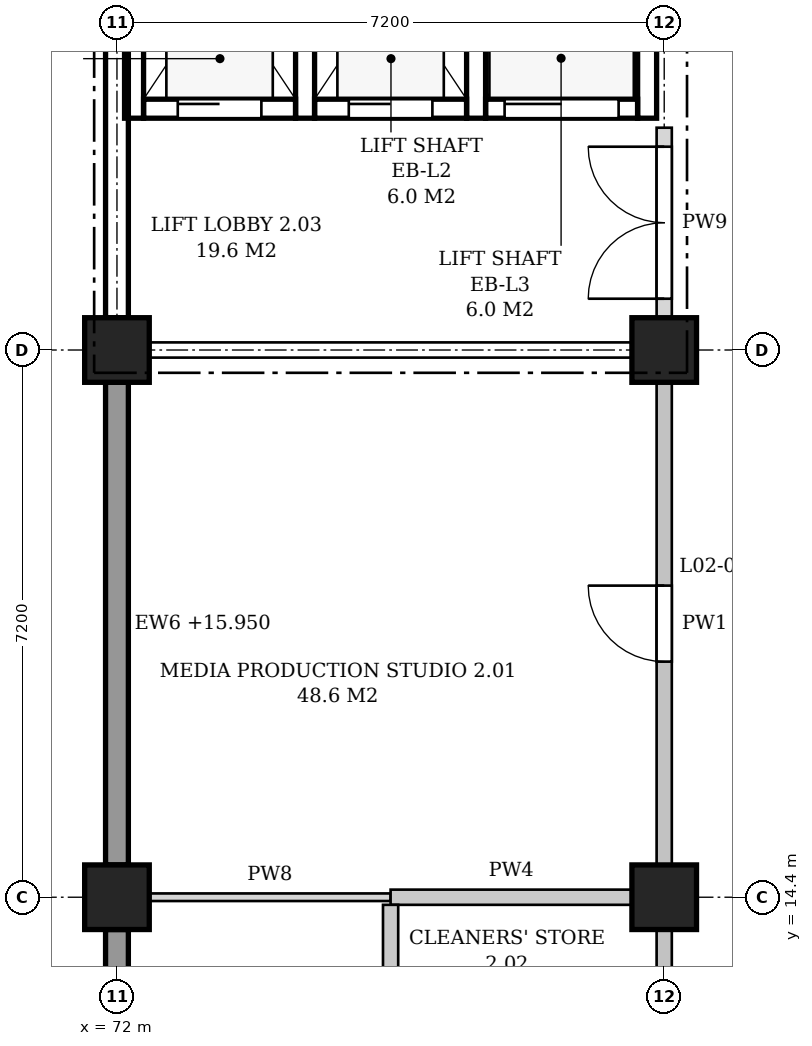
"""IFC4 building model, lengths in metres.
Left out: names, types, materials, properties, quantities, classifications, styles, units other than length and angle.
Written with IfcOpenShell. Run it as: python <this file> out.ifc"""

import sys

from ifc_helpers import new_model, si_unit, direction, frame, frame_2d, origin, origin_2d, place, context, subcontext, project, spatial, polyline, rectangle, outline, extrude, element, fill, save


model = new_model("IFC4")
c1 = context("Model", 3, precision=1e-05, world=origin(), true_north=direction((0.0, 1.0)))
c2 = subcontext(c1, "Body", "Model", "MODEL_VIEW")
j1 = project(units=[si_unit("LENGTHUNIT", "METRE"), si_unit("PLANEANGLEUNIT", "RADIAN")], contexts=[c1])
p1 = place(None, origin())
s1 = spatial("IfcSite", under=j1, at=p1, CompositionType="ELEMENT")
p2 = place(p1, origin())
s2 = spatial("IfcBuilding", under=s1, at=p2, CompositionType="ELEMENT")
p3 = place(p2, frame((0.0, 0.0, 11.4)))
s3 = spatial("IfcBuildingStorey", under=s2, at=p3, CompositionType="ELEMENT", Elevation=11.4)
for number, where, z_axis, x_axis in (
    (1, (72.0, 14.4, 0.0), (0.0, 0.0, 1.0), (1.0, 0.0, 0.0)),
    (2, (72.0, 21.6, 0.0), (0.0, 0.0, 1.0), (1.0, 0.0, 0.0)),
    (3, (79.2, 14.4, 0.0), (0.0, 0.0, 1.0), (1.0, 0.0, 0.0)),
    (4, (79.2, 21.6, 0.0), (0.0, 0.0, 1.0), (1.0, 0.0, 0.0)),
):
    element("IfcColumn", number, at=place(p3, frame(where, z_axis=z_axis, x_axis=x_axis)), inside=s3, PredefinedType="COLUMN", context=c2, shape_type="SweptSolid", body=[
        extrude(rectangle(XDim=0.85, YDim=0.85, at=origin_2d()), origin(), (0.0, 0.0, 1.0), 5.4),
    ])
for number, where, z_axis, x_axis in (
    (5, (72.0, 7.625, 0.0), (0.0, 0.0, 1.0), (0.0, 1.0, 0.0)),
    (6, (72.0, 14.825, 0.0), (0.0, 0.0, 1.0), (0.0, 1.0, 0.0)),
    (7, (72.0, 22.025, 0.0), (0.0, 0.0, 1.0), (0.0, 1.0, 0.0)),
):
    element("IfcWall", number, at=place(p3, frame(where, z_axis=z_axis, x_axis=x_axis)), inside=s3, PredefinedType="STANDARD", context=c2, shape_type="SweptSolid", body=[
        extrude(rectangle(XDim=6.35, YDim=0.3, at=frame_2d((3.175, 0.0))), origin(), (0.0, 0.0, 1.0), 4.55),
    ])
p4 = place(p3, frame((72.225, 24.65, -0.25), z_axis=(0.0, 0.0, 1.0), x_axis=(0.0, 1.0, 0.0)))
e8 = element("IfcWall", 8, at=p4, inside=s3, PredefinedType="SHEAR", context=c2, shape_type="SweptSolid", body=[
    extrude(rectangle(XDim=3.725, YDim=0.25, at=frame_2d((1.863, 0.0))), origin(), (0.0, 0.0, 1.0), 5.4),
])
for number, where, z_axis, x_axis in (
    (9, (74.475, 24.65, -0.25), (0.0, 0.0, 1.0), (0.0, 1.0, 0.0)),
    (10, (76.725, 24.65, -0.25), (0.0, 0.0, 1.0), (0.0, 1.0, 0.0)),
):
    element("IfcWall", number, at=place(p3, frame(where, z_axis=z_axis, x_axis=x_axis)), inside=s3, PredefinedType="SHEAR", context=c2, shape_type="SweptSolid", body=[
        extrude(rectangle(XDim=3.5, YDim=0.25, at=frame_2d((1.75, 0.0))), origin(), (0.0, 0.0, 1.0), 5.4),
    ])
p5 = place(p3, frame((78.975, 24.65, -0.25), z_axis=(0.0, 0.0, 1.0), x_axis=(0.0, 1.0, 0.0)))
e11 = element("IfcWall", 11, at=p5, inside=s3, PredefinedType="SHEAR", context=c2, shape_type="SweptSolid", body=[
    extrude(rectangle(XDim=3.725, YDim=0.25, at=frame_2d((1.863, 0.0))), origin(), (0.0, 0.0, 1.0), 5.4),
])
p6 = place(p3, frame((72.35, 24.775, -0.25), z_axis=(0.0, 0.0, 1.0), x_axis=(1.0, 0.0, 0.0)))
e12 = element("IfcWall", 12, at=p6, inside=s3, PredefinedType="SHEAR", context=c2, shape_type="SweptSolid", body=[
    extrude(rectangle(XDim=2.0, YDim=0.25, at=frame_2d((1.0, 0.0))), origin(), (0.0, 0.0, 1.0), 5.4),
])
p7 = place(p6, frame((0.45, 0.0, 0.25)))
e13 = element("IfcOpeningElement", 13, at=p7, cuts=e12, PredefinedType="OPENING", context=c2, shape_type="SweptSolid", body=[
    extrude(rectangle(XDim=1.1, YDim=2.1, at=frame_2d((0.55, 1.05))), frame((0.0, 0.135, 0.0), z_axis=(0.0, -1.0, 0.0), x_axis=(1.0, 0.0, 0.0)), (0.0, 0.0, 1.0), 0.27),
])
p8 = place(p3, frame((74.6, 24.775, -0.25), z_axis=(0.0, 0.0, 1.0), x_axis=(1.0, 0.0, 0.0)))
e14 = element("IfcWall", 14, at=p8, inside=s3, PredefinedType="SHEAR", context=c2, shape_type="SweptSolid", body=[
    extrude(rectangle(XDim=2.0, YDim=0.25, at=frame_2d((1.0, 0.0))), origin(), (0.0, 0.0, 1.0), 5.4),
])
p9 = place(p8, frame((0.45, 0.0, 0.25)))
e15 = element("IfcOpeningElement", 15, at=p9, cuts=e14, PredefinedType="OPENING", context=c2, shape_type="SweptSolid", body=[
    extrude(rectangle(XDim=1.1, YDim=2.1, at=frame_2d((0.55, 1.05))), frame((0.0, 0.135, 0.0), z_axis=(0.0, -1.0, 0.0), x_axis=(1.0, 0.0, 0.0)), (0.0, 0.0, 1.0), 0.27),
])
p10 = place(p3, frame((76.85, 24.775, -0.25), z_axis=(0.0, 0.0, 1.0), x_axis=(1.0, 0.0, 0.0)))
e16 = element("IfcWall", 16, at=p10, inside=s3, PredefinedType="SHEAR", context=c2, shape_type="SweptSolid", body=[
    extrude(rectangle(XDim=2.0, YDim=0.25, at=frame_2d((1.0, 0.0))), origin(), (0.0, 0.0, 1.0), 5.4),
])
p11 = place(p10, frame((0.25, 0.0, 0.25)))
e17 = element("IfcOpeningElement", 17, at=p11, cuts=e16, PredefinedType="OPENING", context=c2, shape_type="SweptSolid", body=[
    extrude(rectangle(XDim=1.5, YDim=2.1, at=frame_2d((0.75, 1.05))), frame((0.0, 0.135, 0.0), z_axis=(0.0, -1.0, 0.0), x_axis=(1.0, 0.0, 0.0)), (0.0, 0.0, 1.0), 0.27),
])
p12 = place(p3, frame((72.425, 14.4, 0.0), z_axis=(0.0, 0.0, 1.0), x_axis=(1.0, 0.0, 0.0)))
e18 = element("IfcWall", 18, at=p12, inside=s3, PredefinedType="PARTITIONING", context=c2, shape_type="SweptSolid", body=[
    extrude(rectangle(XDim=3.175, YDim=0.1, at=frame_2d((1.587, 0.0))), origin(), (0.0, 0.0, 1.0), 4.4),
])
p13 = place(p3, frame((75.6, 14.4, 0.0), z_axis=(0.0, 0.0, 1.0), x_axis=(1.0, 0.0, 0.0)))
e19 = element("IfcWall", 19, at=p13, inside=s3, PredefinedType="PARTITIONING", context=c2, shape_type="SweptSolid", body=[
    extrude(rectangle(XDim=3.175, YDim=0.2, at=frame_2d((1.587, 0.0))), origin(), (0.0, 0.0, 1.0), 4.4),
])
p14 = place(p3, frame((72.425, 21.6, 0.0), z_axis=(0.0, 0.0, 1.0), x_axis=(1.0, 0.0, 0.0)))
e20 = element("IfcWall", 20, at=p14, inside=s3, PredefinedType="PARTITIONING", context=c2, shape_type="SweptSolid", body=[
    extrude(rectangle(XDim=6.35, YDim=0.2, at=frame_2d((3.175, 0.0))), origin(), (0.0, 0.0, 1.0), 4.4),
])
p15 = place(p3, frame((75.6, 10.9, 0.0), z_axis=(0.0, 0.0, 1.0), x_axis=(0.0, 1.0, 0.0)))
e21 = element("IfcWall", 21, at=p15, inside=s3, PredefinedType="PARTITIONING", context=c2, shape_type="SweptSolid", body=[
    extrude(outline(polyline([(0.0, 0.0), (3.4, 0.0), (3.4, 4.4), (3.25, 4.4), (3.25, 5.15), (0.0, 5.15), (0.0, 0.0)])), frame((0.0, 0.1, 0.0), z_axis=(0.0, -1.0, 0.0), x_axis=(1.0, 0.0, 0.0)), (0.0, 0.0, 1.0), 0.2),
])
p16 = place(p3, frame((79.2, 10.9, 0.0), z_axis=(0.0, 0.0, 1.0), x_axis=(0.0, 1.0, 0.0)))
e22 = element("IfcWall", 22, at=p16, inside=s3, PredefinedType="PARTITIONING", context=c2, shape_type="SweptSolid", body=[
    extrude(rectangle(XDim=3.075, YDim=0.2, at=frame_2d((1.538, 0.0))), origin(), (0.0, 0.0, 1.0), 4.4),
])
p17 = place(p3, frame((79.2, 14.825, 0.0), z_axis=(0.0, 0.0, 1.0), x_axis=(0.0, 1.0, 0.0)))
e23 = element("IfcWall", 23, at=p17, inside=s3, PredefinedType="PARTITIONING", context=c2, shape_type="SweptSolid", body=[
    extrude(rectangle(XDim=6.35, YDim=0.2, at=frame_2d((3.175, 0.0))), origin(), (0.0, 0.0, 1.0), 4.4),
])
p18 = place(p17, frame((2.675, 0.0, 0.0)))
e24 = element("IfcOpeningElement", 24, at=p18, cuts=e23, PredefinedType="OPENING", context=c2, shape_type="SweptSolid", body=[
    extrude(rectangle(XDim=1.0, YDim=2.1, at=frame_2d((0.5, 1.05))), frame((0.0, 0.11, 0.0), z_axis=(0.0, -1.0, 0.0), x_axis=(1.0, 0.0, 0.0)), (0.0, 0.0, 1.0), 0.22),
])
p19 = place(p3, frame((79.2, 22.025, 0.0), z_axis=(0.0, 0.0, 1.0), x_axis=(0.0, 1.0, 0.0)))
e25 = element("IfcWall", 25, at=p19, inside=s3, PredefinedType="PARTITIONING", context=c2, shape_type="SweptSolid", body=[
    extrude(rectangle(XDim=2.5, YDim=0.2, at=frame_2d((1.25, 0.0))), origin(), (0.0, 0.0, 1.0), 4.4),
])
p20 = place(p19, frame((0.25, 0.0, 0.0)))
e26 = element("IfcOpeningElement", 26, at=p20, cuts=e25, PredefinedType="OPENING", context=c2, shape_type="SweptSolid", body=[
    extrude(rectangle(XDim=2.0, YDim=2.4, at=frame_2d((1.0, 1.2))), frame((0.0, 0.11, 0.0), z_axis=(0.0, -1.0, 0.0), x_axis=(1.0, 0.0, 0.0)), (0.0, 0.0, 1.0), 0.22),
])
p21 = place(p7, origin())
e27 = element("IfcDoor", 27, at=p21, inside=s3, OperationType="SLIDING_TO_LEFT", PredefinedType="DOOR", context=c2, shape_type="SweptSolid", body=[
    extrude(rectangle(XDim=1.1, YDim=2.1, at=frame_2d((0.55, 1.05))), frame((0.0, 0.025, 0.0), z_axis=(0.0, -1.0, 0.0), x_axis=(1.0, 0.0, 0.0)), (0.0, 0.0, 1.0), 0.05),
])
fill(e13, e27)
p22 = place(p9, origin())
e28 = element("IfcDoor", 28, at=p22, inside=s3, OperationType="SLIDING_TO_LEFT", PredefinedType="DOOR", context=c2, shape_type="SweptSolid", body=[
    extrude(rectangle(XDim=1.1, YDim=2.1, at=frame_2d((0.55, 1.05))), frame((0.0, 0.025, 0.0), z_axis=(0.0, -1.0, 0.0), x_axis=(1.0, 0.0, 0.0)), (0.0, 0.0, 1.0), 0.05),
])
fill(e15, e28)
p23 = place(p11, origin())
e29 = element("IfcDoor", 29, at=p23, inside=s3, OperationType="SLIDING_TO_LEFT", PredefinedType="DOOR", context=c2, shape_type="SweptSolid", body=[
    extrude(rectangle(XDim=1.5, YDim=2.1, at=frame_2d((0.75, 1.05))), frame((0.0, 0.025, 0.0), z_axis=(0.0, -1.0, 0.0), x_axis=(1.0, 0.0, 0.0)), (0.0, 0.0, 1.0), 0.05),
])
fill(e17, e29)
p24 = place(p20, origin())
e30 = element("IfcDoor", 30, at=p24, inside=s3, OperationType="DOUBLE_DOOR_SINGLE_SWING", PredefinedType="DOOR", context=c2, shape_type="SweptSolid", body=[
    extrude(rectangle(XDim=2.0, YDim=2.4, at=frame_2d((1.0, 1.2))), frame((0.0, 0.025, 0.0), z_axis=(0.0, -1.0, 0.0), x_axis=(1.0, 0.0, 0.0)), (0.0, 0.0, 1.0), 0.05),
])
fill(e26, e30)
p25 = place(p18, origin())
e31 = element("IfcDoor", 31, at=p25, inside=s3, OperationType="SINGLE_SWING_RIGHT", PredefinedType="DOOR", context=c2, shape_type="SweptSolid", body=[
    extrude(rectangle(XDim=1.0, YDim=2.1, at=frame_2d((0.5, 1.05))), frame((0.0, 0.025, 0.0), z_axis=(0.0, -1.0, 0.0), x_axis=(1.0, 0.0, 0.0)), (0.0, 0.0, 1.0), 0.05),
])
fill(e24, e31)
save(model, sys.argv[1])
